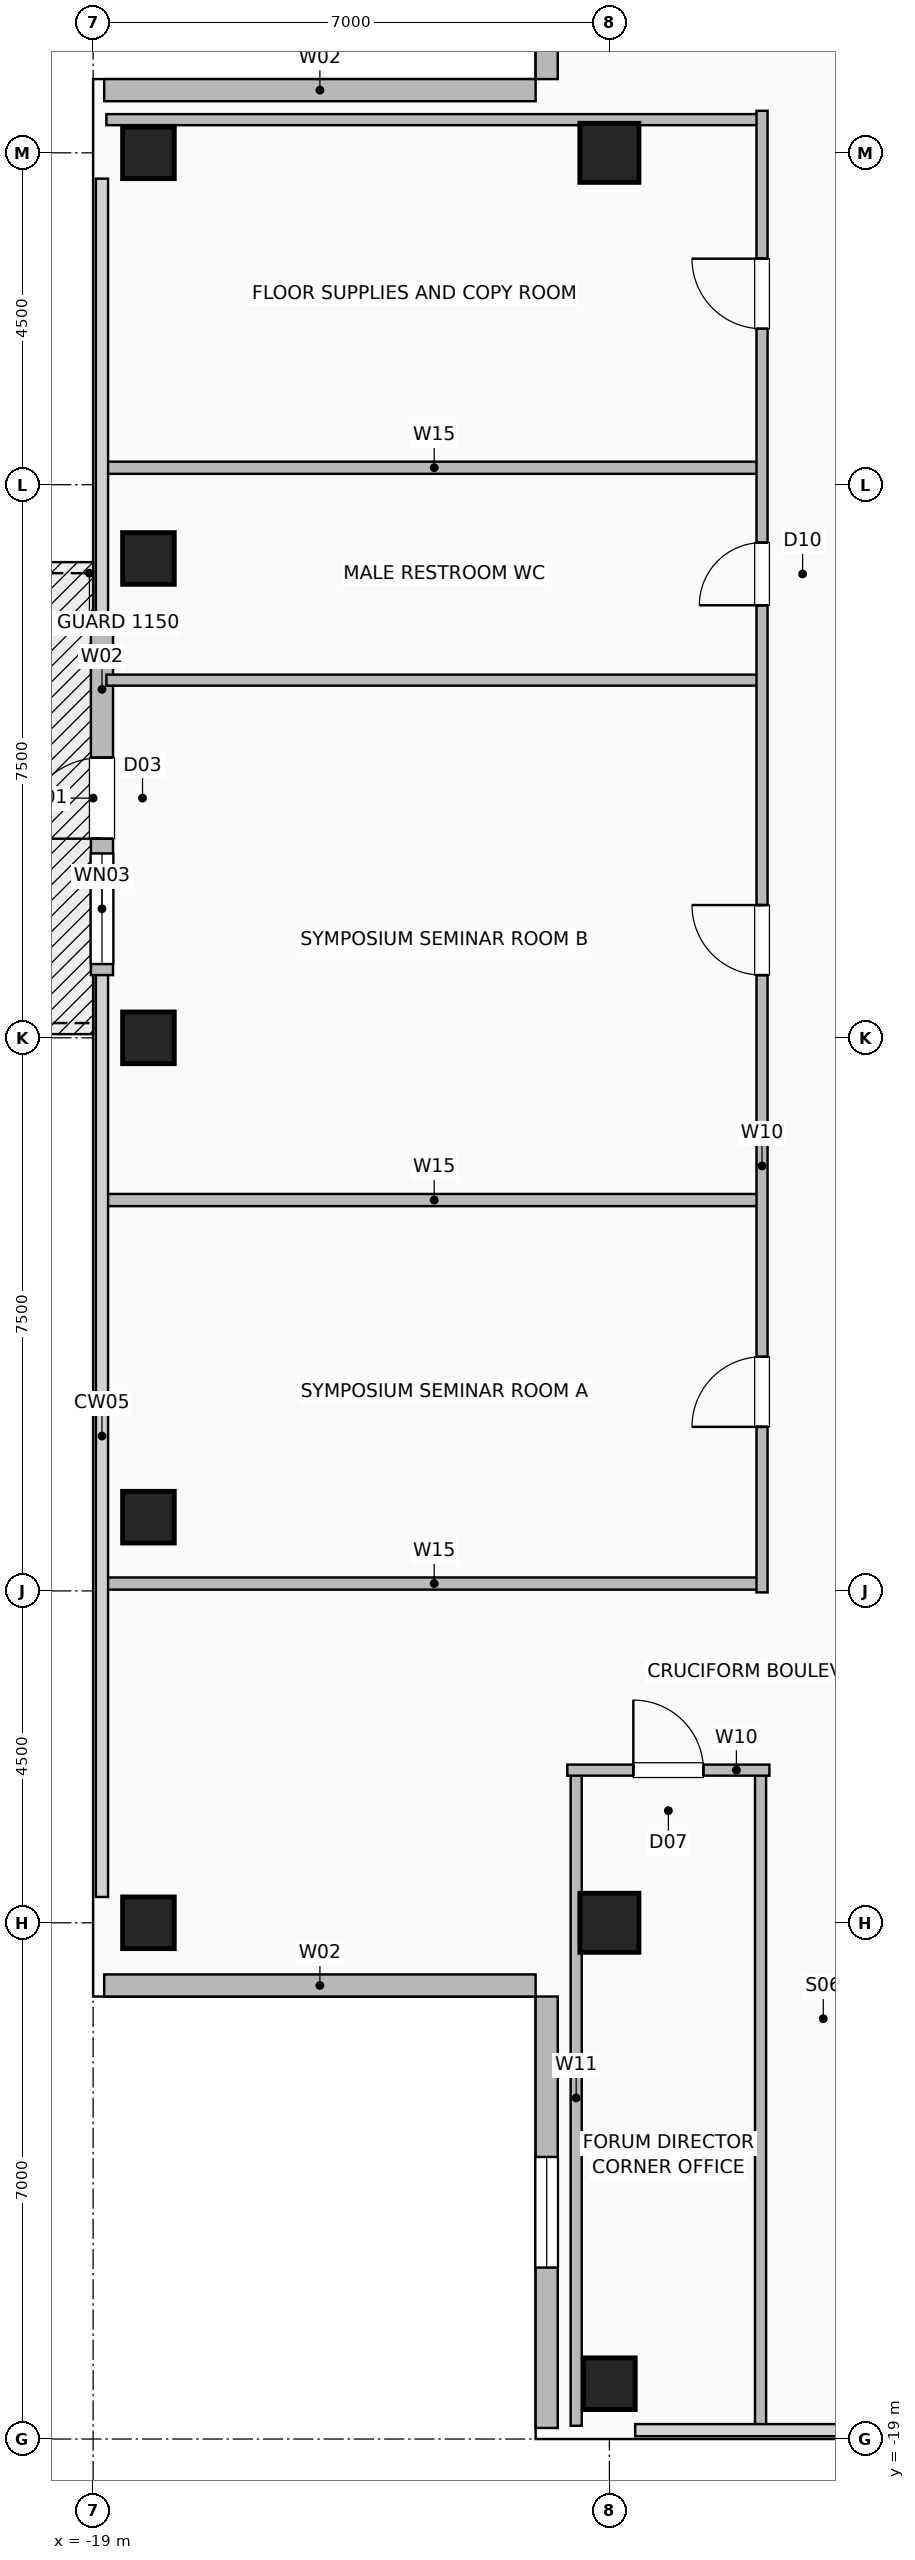
"""IFC4 building model, lengths in metres.
Left out: names, types, materials, properties, quantities, classifications, styles, units other than length and angle.
Written with IfcOpenShell. Run it as: python <this file> out.ifc"""

import sys

from ifc_helpers import new_model, si_unit, direction, frame, frame_2d, origin, origin_2d, place, context, subcontext, project, spatial, rectangle, hollow_rectangle, extrude, element, fill, save


model = new_model("IFC4")
c1 = context("Model", 3, precision=1e-05, world=origin(), true_north=direction((0.0, 1.0)))
c2 = subcontext(c1, "Body", "Model", "MODEL_VIEW")
j1 = project(units=[si_unit("LENGTHUNIT", "METRE"), si_unit("PLANEANGLEUNIT", "RADIAN")], contexts=[c1])
p1 = place(None, origin())
s1 = spatial("IfcSite", under=j1, at=p1, CompositionType="ELEMENT")
p2 = place(p1, origin())
s2 = spatial("IfcBuilding", under=s1, at=p2, CompositionType="ELEMENT")
p3 = place(p2, frame((0.0, 0.0, 286.4)))
s3 = spatial("IfcBuildingStorey", under=s2, at=p3, CompositionType="ELEMENT", Elevation=286.4)
for number, where, z_axis, x_axis in (
    (1, (-12.0, -18.25, 0.0), (0.0, 0.0, 1.0), (1.0, 0.0, 0.0)),
    (2, (-18.25, -12.0, 0.0), (0.0, 0.0, 1.0), (1.0, 0.0, 0.0)),
    (3, (-18.25, -6.5, 0.0), (0.0, 0.0, 1.0), (1.0, 0.0, 0.0)),
    (4, (-18.25, 0.0, 0.0), (0.0, 0.0, 1.0), (1.0, 0.0, 0.0)),
    (5, (-18.25, 6.5, 0.0), (0.0, 0.0, 1.0), (1.0, 0.0, 0.0)),
    (6, (-18.25, 12.0, 0.0), (0.0, 0.0, 1.0), (1.0, 0.0, 0.0)),
):
    element("IfcColumn", number, at=place(p3, frame(where, z_axis=z_axis, x_axis=x_axis)), inside=s3, PredefinedType="COLUMN", context=c2, shape_type="SweptSolid", body=[
        extrude(hollow_rectangle(XDim=0.7, YDim=0.7, WallThickness=0.035, at=origin_2d()), origin(), (0.0, 0.0, 1.0), 3.6),
    ])
for number, where, z_axis, x_axis in (
    (7, (-12.0, -12.0, 0.0), (0.0, 0.0, 1.0), (1.0, 0.0, 0.0)),
    (8, (-12.0, 12.0, 0.0), (0.0, 0.0, 1.0), (1.0, 0.0, 0.0)),
):
    element("IfcColumn", number, at=place(p3, frame(where, z_axis=z_axis, x_axis=x_axis)), inside=s3, PredefinedType="COLUMN", context=c2, shape_type="SweptSolid", body=[
        extrude(hollow_rectangle(XDim=0.8, YDim=0.8, WallThickness=0.04, at=origin_2d()), origin(), (0.0, 0.0, 1.0), 3.6),
    ])
p4 = place(p3, frame((-18.88, 0.85, 0.0), z_axis=(0.0, 0.0, 1.0), x_axis=(0.0, 1.0, 0.0)))
e9 = element("IfcWall", 9, at=p4, inside=s3, PredefinedType="SOLIDWALL", context=c2, shape_type="SweptSolid", body=[
    extrude(rectangle(XDim=4.8, YDim=0.3, at=frame_2d((2.4, 0.0))), origin(), (0.0, 0.0, 1.0), 3.36),
])
p5 = place(p4, frame((1.85, 0.0, 0.0)))
e10 = element("IfcOpeningElement", 10, at=p5, cuts=e9, PredefinedType="OPENING", context=c2, shape_type="SweptSolid", body=[
    extrude(rectangle(XDim=1.1, YDim=2.2, at=frame_2d((0.55, 1.1))), frame((0.0, 0.16, 0.0), z_axis=(0.0, -1.0, 0.0), x_axis=(1.0, 0.0, 0.0)), (0.0, 0.0, 1.0), 0.32),
])
p6 = place(p4, frame((0.15, 0.0, 0.85)))
e11 = element("IfcOpeningElement", 11, at=p6, cuts=e9, PredefinedType="OPENING", context=c2, shape_type="SweptSolid", body=[
    extrude(rectangle(XDim=1.5, YDim=1.8, at=frame_2d((0.75, 0.9))), frame((0.0, 0.16, 0.0), z_axis=(0.0, -1.0, 0.0), x_axis=(1.0, 0.0, 0.0)), (0.0, 0.0, 1.0), 0.32),
])
p7 = place(p3, frame((-12.85, -18.85, 0.0), z_axis=(0.0, 0.0, 1.0), x_axis=(0.0, 1.0, 0.0)))
e12 = element("IfcWall", 12, at=p7, inside=s3, PredefinedType="SOLIDWALL", context=c2, shape_type="SweptSolid", body=[
    extrude(rectangle(XDim=5.85, YDim=0.3, at=frame_2d((2.925, 0.0))), origin(), (0.0, 0.0, 1.0), 3.36),
])
p8 = place(p7, frame((2.175, 0.0, 0.9)))
e13 = element("IfcOpeningElement", 13, at=p8, cuts=e12, PredefinedType="OPENING", context=c2, shape_type="SweptSolid", body=[
    extrude(rectangle(XDim=1.5, YDim=1.8, at=frame_2d((0.75, 0.9))), frame((0.0, 0.16, 0.0), z_axis=(0.0, -1.0, 0.0), x_axis=(1.0, 0.0, 0.0)), (0.0, 0.0, 1.0), 0.32),
])
p9 = place(p3, frame((-18.85, -12.85, 0.0), z_axis=(0.0, 0.0, 1.0), x_axis=(1.0, 0.0, 0.0)))
e14 = element("IfcWall", 14, at=p9, inside=s3, PredefinedType="SOLIDWALL", context=c2, shape_type="SweptSolid", body=[
    extrude(rectangle(XDim=5.85, YDim=0.3, at=frame_2d((2.925, 0.0))), origin(), (0.0, 0.0, 1.0), 3.36),
])
p10 = place(p3, frame((-12.85, 18.85, 0.0), z_axis=(0.0, 0.0, 1.0), x_axis=(0.0, -1.0, 0.0)))
e15 = element("IfcWall", 15, at=p10, inside=s3, PredefinedType="SOLIDWALL", context=c2, shape_type="SweptSolid", body=[
    extrude(rectangle(XDim=5.85, YDim=0.3, at=frame_2d((2.925, 0.0))), origin(), (0.0, 0.0, 1.0), 3.36),
])
p11 = place(p10, frame((2.175, 0.0, 0.9)))
e16 = element("IfcOpeningElement", 16, at=p11, cuts=e15, PredefinedType="OPENING", context=c2, shape_type="SweptSolid", body=[
    extrude(rectangle(XDim=1.5, YDim=1.8, at=frame_2d((0.75, 0.9))), frame((0.0, 0.16, 0.0), z_axis=(0.0, -1.0, 0.0), x_axis=(1.0, 0.0, 0.0)), (0.0, 0.0, 1.0), 0.32),
])
p12 = place(p3, frame((-18.85, 12.85, 0.0), z_axis=(0.0, 0.0, 1.0), x_axis=(1.0, 0.0, 0.0)))
e17 = element("IfcWall", 17, at=p12, inside=s3, PredefinedType="SOLIDWALL", context=c2, shape_type="SweptSolid", body=[
    extrude(rectangle(XDim=5.85, YDim=0.3, at=frame_2d((2.925, 0.0))), origin(), (0.0, 0.0, 1.0), 3.36),
])
for number, where, z_axis, x_axis in (
    (18, (-12.45, -18.82, 0.0), (0.0, 0.0, 1.0), (0.0, 1.0, 0.0)),
    (19, (-9.95, -18.82, 0.0), (0.0, 0.0, 1.0), (0.0, 1.0, 0.0)),
):
    element("IfcWall", number, at=place(p3, frame(where, z_axis=z_axis, x_axis=x_axis)), inside=s3, PredefinedType="PARTITIONING", context=c2, shape_type="SweptSolid", body=[
        extrude(rectangle(XDim=8.89, YDim=0.15, at=frame_2d((4.445, 0.0))), origin(), (0.0, 0.0, 1.0), 3.36),
    ])
p13 = place(p3, frame((-12.57, -9.93, 0.0), z_axis=(0.0, 0.0, 1.0), x_axis=(1.0, 0.0, 0.0)))
e20 = element("IfcWall", 20, at=p13, inside=s3, PredefinedType="PARTITIONING", context=c2, shape_type="SweptSolid", body=[
    extrude(rectangle(XDim=2.74, YDim=0.15, at=frame_2d((1.37, 0.0))), origin(), (0.0, 0.0, 1.0), 3.36),
])
p14 = place(p13, frame((0.895, 0.0, 0.0)))
e21 = element("IfcOpeningElement", 21, at=p14, cuts=e20, PredefinedType="OPENING", context=c2, shape_type="SweptSolid", body=[
    extrude(rectangle(XDim=0.95, YDim=2.06, at=frame_2d((0.475, 1.03))), frame((0.0, 0.085, 0.0), z_axis=(0.0, -1.0, 0.0), x_axis=(1.0, 0.0, 0.0)), (0.0, 0.0, 1.0), 0.17),
])
for number, where, z_axis, x_axis in (
    (22, (-18.82, 7.73, 0.0), (0.0, 0.0, 1.0), (1.0, 0.0, 0.0)),
    (23, (-18.82, -7.4, 0.0), (0.0, 0.0, 1.0), (1.0, 0.0, 0.0)),
    (24, (-18.82, -2.2, 0.0), (0.0, 0.0, 1.0), (1.0, 0.0, 0.0)),
):
    element("IfcWall", number, at=place(p3, frame(where, z_axis=z_axis, x_axis=x_axis)), inside=s3, PredefinedType="PLUMBINGWALL", context=c2, shape_type="SweptSolid", body=[
        extrude(rectangle(XDim=8.89, YDim=0.165, at=frame_2d((4.445, 0.0))), origin(), (0.0, 0.0, 1.0), 3.36),
    ])
p15 = place(p3, frame((-18.82, 4.85, 0.0), z_axis=(0.0, 0.0, 1.0), x_axis=(1.0, 0.0, 0.0)))
e25 = element("IfcWall", 25, at=p15, inside=s3, PredefinedType="PARTITIONING", context=c2, shape_type="SweptSolid", body=[
    extrude(rectangle(XDim=8.89, YDim=0.15, at=frame_2d((4.445, 0.0))), origin(), (0.0, 0.0, 1.0), 2.977),
])
p16 = place(p3, frame((-18.82, 12.45, 0.0), z_axis=(0.0, 0.0, 1.0), x_axis=(1.0, 0.0, 0.0)))
e26 = element("IfcWall", 26, at=p16, inside=s3, PredefinedType="PARTITIONING", context=c2, shape_type="SweptSolid", body=[
    extrude(rectangle(XDim=8.89, YDim=0.15, at=frame_2d((4.445, 0.0))), origin(), (0.0, 0.0, 1.0), 3.36),
])
p17 = place(p3, frame((-9.93, -7.52, 0.0), z_axis=(0.0, 0.0, 1.0), x_axis=(0.0, 1.0, 0.0)))
e27 = element("IfcWall", 27, at=p17, inside=s3, PredefinedType="PARTITIONING", context=c2, shape_type="SweptSolid", body=[
    extrude(rectangle(XDim=20.09, YDim=0.15, at=frame_2d((10.045, 0.0))), origin(), (0.0, 0.0, 1.0), 3.36),
])
p18 = place(p17, frame((2.245, 0.0, 0.0)))
e28 = element("IfcOpeningElement", 28, at=p18, cuts=e27, PredefinedType="OPENING", context=c2, shape_type="SweptSolid", body=[
    extrude(rectangle(XDim=0.95, YDim=2.06, at=frame_2d((0.475, 1.03))), frame((0.0, 0.085, 0.0), z_axis=(0.0, -1.0, 0.0), x_axis=(1.0, 0.0, 0.0)), (0.0, 0.0, 1.0), 0.17),
])
p19 = place(p17, frame((8.37, 0.0, 0.0)))
e29 = element("IfcOpeningElement", 29, at=p19, cuts=e27, PredefinedType="OPENING", context=c2, shape_type="SweptSolid", body=[
    extrude(rectangle(XDim=0.95, YDim=2.06, at=frame_2d((0.475, 1.03))), frame((0.0, 0.085, 0.0), z_axis=(0.0, -1.0, 0.0), x_axis=(1.0, 0.0, 0.0)), (0.0, 0.0, 1.0), 0.17),
])
p20 = place(p17, frame((13.385, 0.0, 0.0)))
e30 = element("IfcOpeningElement", 30, at=p20, cuts=e27, PredefinedType="OPENING", context=c2, shape_type="SweptSolid", body=[
    extrude(rectangle(XDim=0.85, YDim=2.05, at=frame_2d((0.425, 1.025))), frame((0.0, 0.085, 0.0), z_axis=(0.0, -1.0, 0.0), x_axis=(1.0, 0.0, 0.0)), (0.0, 0.0, 1.0), 0.17),
])
p21 = place(p17, frame((17.135, 0.0, 0.0)))
e31 = element("IfcOpeningElement", 31, at=p21, cuts=e27, PredefinedType="OPENING", context=c2, shape_type="SweptSolid", body=[
    extrude(rectangle(XDim=0.95, YDim=2.06, at=frame_2d((0.475, 1.03))), frame((0.0, 0.085, 0.0), z_axis=(0.0, -1.0, 0.0), x_axis=(1.0, 0.0, 0.0)), (0.0, 0.0, 1.0), 0.17),
])
p22 = place(p5, origin())
e32 = element("IfcDoor", 32, at=p22, inside=s3, OperationType="SINGLE_SWING_LEFT", PredefinedType="DOOR", context=c2, shape_type="SweptSolid", body=[
    extrude(rectangle(XDim=1.1, YDim=2.2, at=frame_2d((0.55, 1.1))), frame((0.0, 0.025, 0.0), z_axis=(0.0, -1.0, 0.0), x_axis=(1.0, 0.0, 0.0)), (0.0, 0.0, 1.0), 0.05),
])
fill(e10, e32)
p23 = place(p6, origin())
e33 = element("IfcWindow", 33, at=p23, inside=s3, PartitioningType="SINGLE_PANEL", PredefinedType="WINDOW", context=c2, shape_type="SweptSolid", body=[
    extrude(rectangle(XDim=1.5, YDim=1.8, at=frame_2d((0.75, 0.9))), frame((0.0, 0.03, 0.0), z_axis=(0.0, -1.0, 0.0), x_axis=(1.0, 0.0, 0.0)), (0.0, 0.0, 1.0), 0.06),
])
fill(e11, e33)
p24 = place(p8, origin())
e34 = element("IfcWindow", 34, at=p24, inside=s3, PartitioningType="SINGLE_PANEL", PredefinedType="WINDOW", context=c2, shape_type="SweptSolid", body=[
    extrude(rectangle(XDim=1.5, YDim=1.8, at=frame_2d((0.75, 0.9))), frame((0.0, 0.03, 0.0), z_axis=(0.0, -1.0, 0.0), x_axis=(1.0, 0.0, 0.0)), (0.0, 0.0, 1.0), 0.06),
])
fill(e13, e34)
p25 = place(p14, origin())
e35 = element("IfcDoor", 35, at=p25, inside=s3, OperationType="SINGLE_SWING_LEFT", PredefinedType="DOOR", context=c2, shape_type="SweptSolid", body=[
    extrude(rectangle(XDim=0.95, YDim=2.06, at=frame_2d((0.475, 1.03))), frame((0.0, 0.025, 0.0), z_axis=(0.0, -1.0, 0.0), x_axis=(1.0, 0.0, 0.0)), (0.0, 0.0, 1.0), 0.05),
])
fill(e21, e35)
p26 = place(p18, origin())
e36 = element("IfcDoor", 36, at=p26, inside=s3, OperationType="SINGLE_SWING_LEFT", PredefinedType="DOOR", context=c2, shape_type="SweptSolid", body=[
    extrude(rectangle(XDim=0.95, YDim=2.06, at=frame_2d((0.475, 1.03))), frame((0.0, 0.025, 0.0), z_axis=(0.0, -1.0, 0.0), x_axis=(1.0, 0.0, 0.0)), (0.0, 0.0, 1.0), 0.05),
])
fill(e28, e36)
p27 = place(p19, origin())
e37 = element("IfcDoor", 37, at=p27, inside=s3, OperationType="SINGLE_SWING_RIGHT", PredefinedType="DOOR", context=c2, shape_type="SweptSolid", body=[
    extrude(rectangle(XDim=0.95, YDim=2.06, at=frame_2d((0.475, 1.03))), frame((0.0, 0.025, 0.0), z_axis=(0.0, -1.0, 0.0), x_axis=(1.0, 0.0, 0.0)), (0.0, 0.0, 1.0), 0.05),
])
fill(e29, e37)
p28 = place(p20, origin())
e38 = element("IfcDoor", 38, at=p28, inside=s3, OperationType="SINGLE_SWING_LEFT", PredefinedType="DOOR", context=c2, shape_type="SweptSolid", body=[
    extrude(rectangle(XDim=0.85, YDim=2.05, at=frame_2d((0.425, 1.025))), frame((0.0, 0.025, 0.0), z_axis=(0.0, -1.0, 0.0), x_axis=(1.0, 0.0, 0.0)), (0.0, 0.0, 1.0), 0.05),
])
fill(e30, e38)
p29 = place(p21, origin())
e39 = element("IfcDoor", 39, at=p29, inside=s3, OperationType="SINGLE_SWING_RIGHT", PredefinedType="DOOR", context=c2, shape_type="SweptSolid", body=[
    extrude(rectangle(XDim=0.95, YDim=2.06, at=frame_2d((0.475, 1.03))), frame((0.0, 0.025, 0.0), z_axis=(0.0, -1.0, 0.0), x_axis=(1.0, 0.0, 0.0)), (0.0, 0.0, 1.0), 0.05),
])
fill(e31, e39)
save(model, sys.argv[1])
